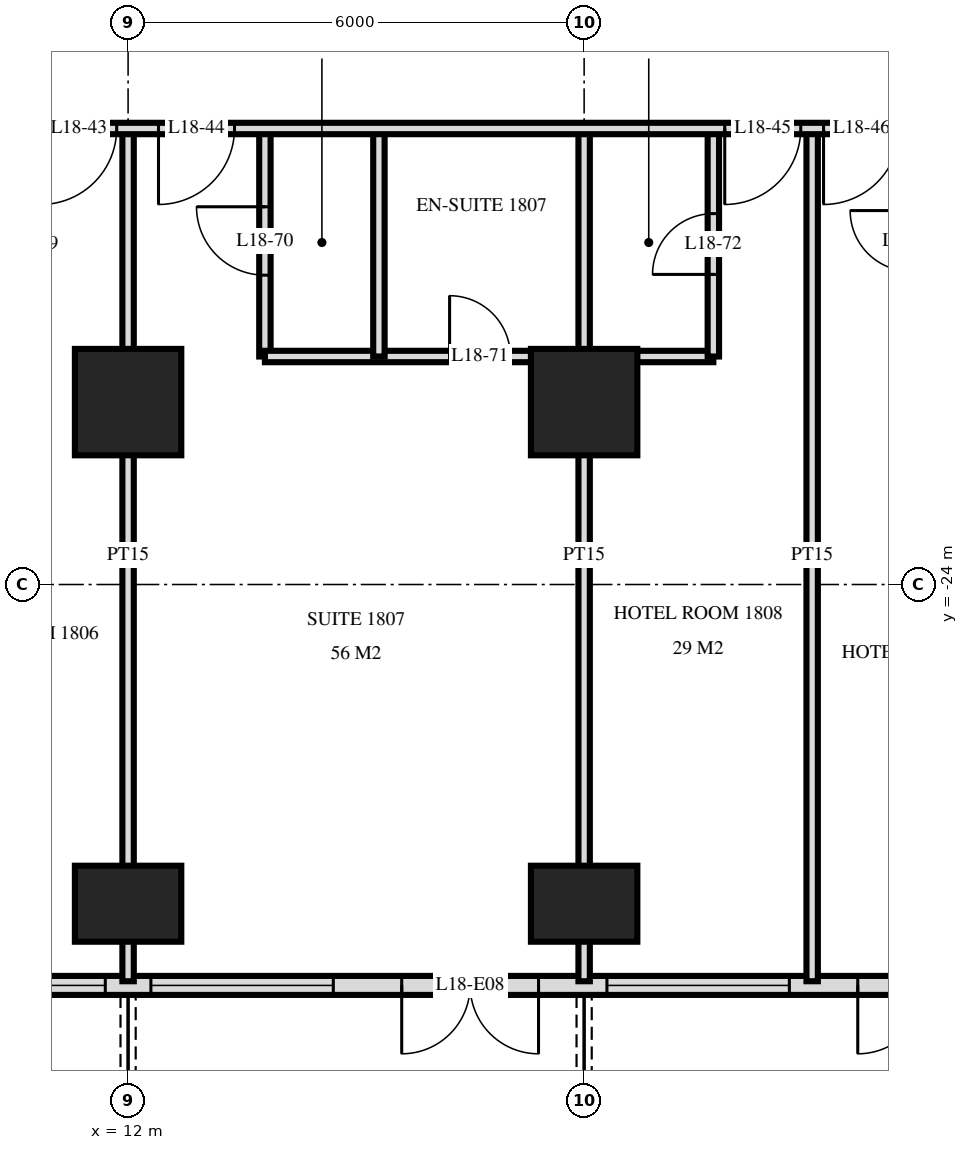
"""IFC4 building model, lengths in metres.
Left out: names, types, materials, properties, quantities, classifications, styles, units other than length and angle.
Written with IfcOpenShell. Run it as: python <this file> out.ifc"""

import sys

from ifc_helpers import new_model, si_unit, direction, frame, frame_2d, origin, origin_2d, place, context, subcontext, project, spatial, rectangle, extrude, element, fill, save


model = new_model("IFC4")
c1 = context("Model", 3, precision=1e-05, world=origin(), true_north=direction((0.0, 1.0)))
c2 = subcontext(c1, "Body", "Model", "MODEL_VIEW")
j1 = project(units=[si_unit("LENGTHUNIT", "METRE"), si_unit("PLANEANGLEUNIT", "RADIAN")], contexts=[c1])
p1 = place(None, origin())
s1 = spatial("IfcSite", under=j1, at=p1, CompositionType="ELEMENT")
p2 = place(p1, origin())
s2 = spatial("IfcBuilding", under=s1, at=p2, CompositionType="ELEMENT")
p3 = place(p2, frame((0.0, 0.0, 74.4)))
s3 = spatial("IfcBuildingStorey", under=s2, at=p3, CompositionType="ELEMENT", Elevation=74.4)
p4 = place(p3, frame((12.0, -28.2, 0.0), z_axis=(0.0, 0.0, 1.0), x_axis=(1.0, 0.0, 0.0)))
e1 = element("IfcColumn", 1, at=p4, inside=s3, PredefinedType="COLUMN", context=c2, shape_type="SweptSolid", body=[
    extrude(rectangle(XDim=1.4, YDim=1.0, at=origin_2d()), origin(), (0.0, 0.0, 1.0), 3.6),
])
p5 = place(p3, frame((12.0, -21.6, 0.0), z_axis=(0.0, 0.0, 1.0), x_axis=(1.0, 0.0, 0.0)))
e2 = element("IfcColumn", 2, at=p5, inside=s3, PredefinedType="COLUMN", context=c2, shape_type="SweptSolid", body=[
    extrude(rectangle(XDim=1.4, YDim=1.4, at=origin_2d()), origin(), (0.0, 0.0, 1.0), 3.6),
])
p6 = place(p3, frame((18.0, -28.2, 0.0), z_axis=(0.0, 0.0, 1.0), x_axis=(1.0, 0.0, 0.0)))
e3 = element("IfcColumn", 3, at=p6, inside=s3, PredefinedType="COLUMN", context=c2, shape_type="SweptSolid", body=[
    extrude(rectangle(XDim=1.4, YDim=1.0, at=origin_2d()), origin(), (0.0, 0.0, 1.0), 3.6),
])
p7 = place(p3, frame((18.0, -21.6, 0.0), z_axis=(0.0, 0.0, 1.0), x_axis=(1.0, 0.0, 0.0)))
e4 = element("IfcColumn", 4, at=p7, inside=s3, PredefinedType="COLUMN", context=c2, shape_type="SweptSolid", body=[
    extrude(rectangle(XDim=1.4, YDim=1.4, at=origin_2d()), origin(), (0.0, 0.0, 1.0), 3.6),
])
p8 = place(p3, frame((-28.775, -29.275, 0.0), z_axis=(0.0, 0.0, 1.0), x_axis=(1.0, 0.0, 0.0)))
e5 = element("IfcWall", 5, at=p8, inside=s3, PredefinedType="SOLIDWALL", context=c2, shape_type="SweptSolid", body=[
    extrude(rectangle(XDim=57.551, YDim=0.25, at=frame_2d((28.775, 0.0))), origin(), (0.0, 0.0, 1.0), 3.32),
])
p9 = place(p8, frame((0.575, 0.0, 0.0)))
e6 = element("IfcOpeningElement", 6, at=p9, cuts=e5, PredefinedType="OPENING", context=c2, shape_type="SweptSolid", body=[
    extrude(rectangle(XDim=1.8, YDim=2.4, at=frame_2d((0.9, 1.2))), frame((0.0, 0.135, 0.0), z_axis=(0.0, -1.0, 0.0), x_axis=(1.0, 0.0, 0.0)), (0.0, 0.0, 1.0), 0.27),
])
p10 = place(p8, frame((5.075, 0.0, 0.3)))
e7 = element("IfcOpeningElement", 7, at=p10, cuts=e5, PredefinedType="OPENING", context=c2, shape_type="SweptSolid", body=[
    extrude(rectangle(XDim=2.4, YDim=2.1, at=frame_2d((1.2, 1.05))), frame((0.0, 0.135, 0.0), z_axis=(0.0, -1.0, 0.0), x_axis=(1.0, 0.0, 0.0)), (0.0, 0.0, 1.0), 0.27),
])
p11 = place(p8, frame((8.375, 0.0, 0.0)))
e8 = element("IfcOpeningElement", 8, at=p11, cuts=e5, PredefinedType="OPENING", context=c2, shape_type="SweptSolid", body=[
    extrude(rectangle(XDim=1.8, YDim=2.4, at=frame_2d((0.9, 1.2))), frame((0.0, 0.135, 0.0), z_axis=(0.0, -1.0, 0.0), x_axis=(1.0, 0.0, 0.0)), (0.0, 0.0, 1.0), 0.27),
])
p12 = place(p8, frame((11.375, 0.0, 0.0)))
e9 = element("IfcOpeningElement", 9, at=p12, cuts=e5, PredefinedType="OPENING", context=c2, shape_type="SweptSolid", body=[
    extrude(rectangle(XDim=1.8, YDim=2.4, at=frame_2d((0.9, 1.2))), frame((0.0, 0.135, 0.0), z_axis=(0.0, -1.0, 0.0), x_axis=(1.0, 0.0, 0.0)), (0.0, 0.0, 1.0), 0.27),
])
p13 = place(p8, frame((14.075, 0.0, 0.3)))
e10 = element("IfcOpeningElement", 10, at=p13, cuts=e5, PredefinedType="OPENING", context=c2, shape_type="SweptSolid", body=[
    extrude(rectangle(XDim=2.4, YDim=2.1, at=frame_2d((1.2, 1.05))), frame((0.0, 0.135, 0.0), z_axis=(0.0, -1.0, 0.0), x_axis=(1.0, 0.0, 0.0)), (0.0, 0.0, 1.0), 0.27),
])
p14 = place(p8, frame((17.375, 0.0, 0.0)))
e11 = element("IfcOpeningElement", 11, at=p14, cuts=e5, PredefinedType="OPENING", context=c2, shape_type="SweptSolid", body=[
    extrude(rectangle(XDim=1.8, YDim=2.4, at=frame_2d((0.9, 1.2))), frame((0.0, 0.135, 0.0), z_axis=(0.0, -1.0, 0.0), x_axis=(1.0, 0.0, 0.0)), (0.0, 0.0, 1.0), 0.27),
])
p15 = place(p8, frame((20.075, 0.0, 0.3)))
e12 = element("IfcOpeningElement", 12, at=p15, cuts=e5, PredefinedType="OPENING", context=c2, shape_type="SweptSolid", body=[
    extrude(rectangle(XDim=2.4, YDim=2.1, at=frame_2d((1.2, 1.05))), frame((0.0, 0.135, 0.0), z_axis=(0.0, -1.0, 0.0), x_axis=(1.0, 0.0, 0.0)), (0.0, 0.0, 1.0), 0.27),
])
p16 = place(p8, frame((23.075, 0.0, 0.3)))
e13 = element("IfcOpeningElement", 13, at=p16, cuts=e5, PredefinedType="OPENING", context=c2, shape_type="SweptSolid", body=[
    extrude(rectangle(XDim=2.4, YDim=2.1, at=frame_2d((1.2, 1.05))), frame((0.0, 0.135, 0.0), z_axis=(0.0, -1.0, 0.0), x_axis=(1.0, 0.0, 0.0)), (0.0, 0.0, 1.0), 0.27),
])
p17 = place(p8, frame((26.375, 0.0, 0.0)))
e14 = element("IfcOpeningElement", 14, at=p17, cuts=e5, PredefinedType="OPENING", context=c2, shape_type="SweptSolid", body=[
    extrude(rectangle(XDim=1.8, YDim=2.4, at=frame_2d((0.9, 1.2))), frame((0.0, 0.135, 0.0), z_axis=(0.0, -1.0, 0.0), x_axis=(1.0, 0.0, 0.0)), (0.0, 0.0, 1.0), 0.27),
])
p18 = place(p8, frame((29.375, 0.0, 0.0)))
e15 = element("IfcOpeningElement", 15, at=p18, cuts=e5, PredefinedType="OPENING", context=c2, shape_type="SweptSolid", body=[
    extrude(rectangle(XDim=1.8, YDim=2.4, at=frame_2d((0.9, 1.2))), frame((0.0, 0.135, 0.0), z_axis=(0.0, -1.0, 0.0), x_axis=(1.0, 0.0, 0.0)), (0.0, 0.0, 1.0), 0.27),
])
p19 = place(p8, frame((32.075, 0.0, 0.3)))
e16 = element("IfcOpeningElement", 16, at=p19, cuts=e5, PredefinedType="OPENING", context=c2, shape_type="SweptSolid", body=[
    extrude(rectangle(XDim=2.4, YDim=2.1, at=frame_2d((1.2, 1.05))), frame((0.0, 0.135, 0.0), z_axis=(0.0, -1.0, 0.0), x_axis=(1.0, 0.0, 0.0)), (0.0, 0.0, 1.0), 0.27),
])
p20 = place(p8, frame((35.375, 0.0, 0.0)))
e17 = element("IfcOpeningElement", 17, at=p20, cuts=e5, PredefinedType="OPENING", context=c2, shape_type="SweptSolid", body=[
    extrude(rectangle(XDim=1.8, YDim=2.4, at=frame_2d((0.9, 1.2))), frame((0.0, 0.135, 0.0), z_axis=(0.0, -1.0, 0.0), x_axis=(1.0, 0.0, 0.0)), (0.0, 0.0, 1.0), 0.27),
])
p21 = place(p8, frame((38.075, 0.0, 0.3)))
e18 = element("IfcOpeningElement", 18, at=p21, cuts=e5, PredefinedType="OPENING", context=c2, shape_type="SweptSolid", body=[
    extrude(rectangle(XDim=2.4, YDim=2.1, at=frame_2d((1.2, 1.05))), frame((0.0, 0.135, 0.0), z_axis=(0.0, -1.0, 0.0), x_axis=(1.0, 0.0, 0.0)), (0.0, 0.0, 1.0), 0.27),
])
p22 = place(p8, frame((41.075, 0.0, 0.3)))
e19 = element("IfcOpeningElement", 19, at=p22, cuts=e5, PredefinedType="OPENING", context=c2, shape_type="SweptSolid", body=[
    extrude(rectangle(XDim=2.4, YDim=2.1, at=frame_2d((1.2, 1.05))), frame((0.0, 0.135, 0.0), z_axis=(0.0, -1.0, 0.0), x_axis=(1.0, 0.0, 0.0)), (0.0, 0.0, 1.0), 0.27),
])
p23 = place(p8, frame((44.375, 0.0, 0.0)))
e20 = element("IfcOpeningElement", 20, at=p23, cuts=e5, PredefinedType="OPENING", context=c2, shape_type="SweptSolid", body=[
    extrude(rectangle(XDim=1.8, YDim=2.4, at=frame_2d((0.9, 1.2))), frame((0.0, 0.135, 0.0), z_axis=(0.0, -1.0, 0.0), x_axis=(1.0, 0.0, 0.0)), (0.0, 0.0, 1.0), 0.27),
])
p24 = place(p8, frame((47.075, 0.0, 0.3)))
e21 = element("IfcOpeningElement", 21, at=p24, cuts=e5, PredefinedType="OPENING", context=c2, shape_type="SweptSolid", body=[
    extrude(rectangle(XDim=2.4, YDim=2.1, at=frame_2d((1.2, 1.05))), frame((0.0, 0.135, 0.0), z_axis=(0.0, -1.0, 0.0), x_axis=(1.0, 0.0, 0.0)), (0.0, 0.0, 1.0), 0.27),
])
p25 = place(p8, frame((50.375, 0.0, 0.0)))
e22 = element("IfcOpeningElement", 22, at=p25, cuts=e5, PredefinedType="OPENING", context=c2, shape_type="SweptSolid", body=[
    extrude(rectangle(XDim=1.8, YDim=2.4, at=frame_2d((0.9, 1.2))), frame((0.0, 0.135, 0.0), z_axis=(0.0, -1.0, 0.0), x_axis=(1.0, 0.0, 0.0)), (0.0, 0.0, 1.0), 0.27),
])
p26 = place(p8, frame((53.375, 0.0, 0.0)))
e23 = element("IfcOpeningElement", 23, at=p26, cuts=e5, PredefinedType="OPENING", context=c2, shape_type="SweptSolid", body=[
    extrude(rectangle(XDim=1.8, YDim=2.4, at=frame_2d((0.9, 1.2))), frame((0.0, 0.135, 0.0), z_axis=(0.0, -1.0, 0.0), x_axis=(1.0, 0.0, 0.0)), (0.0, 0.0, 1.0), 0.27),
])
p27 = place(p3, frame((21.0, -29.22, 0.0), z_axis=(0.0, 0.0, 1.0), x_axis=(0.0, 1.0, 0.0)))
e24 = element("IfcWall", 24, at=p27, inside=s3, PredefinedType="PARTITIONING", context=c2, shape_type="SweptSolid", body=[
    extrude(rectangle(XDim=11.22, YDim=0.15, at=frame_2d((5.61, 0.0))), origin(), (0.0, 0.0, 1.0), 3.32),
])
p28 = place(p3, frame((19.7, -21.0, 0.0), z_axis=(0.0, 0.0, 1.0), x_axis=(0.0, 1.0, 0.0)))
e25 = element("IfcWall", 25, at=p28, inside=s3, PredefinedType="PARTITIONING", context=c2, shape_type="SweptSolid", body=[
    extrude(rectangle(XDim=3.0, YDim=0.15, at=frame_2d((1.5, 0.0))), origin(), (0.0, 0.0, 1.0), 3.32),
])
p29 = place(p28, frame((1.08, 0.0, 0.0)))
e26 = element("IfcOpeningElement", 26, at=p29, cuts=e25, PredefinedType="OPENING", context=c2, shape_type="SweptSolid", body=[
    extrude(rectangle(XDim=0.8, YDim=2.1, at=frame_2d((0.4, 1.05))), frame((0.0, 0.085, 0.0), z_axis=(0.0, -1.0, 0.0), x_axis=(1.0, 0.0, 0.0)), (0.0, 0.0, 1.0), 0.17),
])
p30 = place(p3, frame((18.0, -29.22, 0.0), z_axis=(0.0, 0.0, 1.0), x_axis=(0.0, 1.0, 0.0)))
e27 = element("IfcWall", 27, at=p30, inside=s3, PredefinedType="PARTITIONING", context=c2, shape_type="SweptSolid", body=[
    extrude(rectangle(XDim=11.22, YDim=0.15, at=frame_2d((5.61, 0.0))), origin(), (0.0, 0.0, 1.0), 3.32),
])
p31 = place(p3, frame((15.3, -21.0, 0.0), z_axis=(0.0, 0.0, 1.0), x_axis=(0.0, 1.0, 0.0)))
e28 = element("IfcWall", 28, at=p31, inside=s3, PredefinedType="PARTITIONING", context=c2, shape_type="SweptSolid", body=[
    extrude(rectangle(XDim=3.0, YDim=0.15, at=frame_2d((1.5, 0.0))), origin(), (0.0, 0.0, 1.0), 3.32),
])
p32 = place(p3, frame((13.8, -21.0, 0.0), z_axis=(0.0, 0.0, 1.0), x_axis=(0.0, 1.0, 0.0)))
e29 = element("IfcWall", 29, at=p32, inside=s3, PredefinedType="PARTITIONING", context=c2, shape_type="SweptSolid", body=[
    extrude(rectangle(XDim=3.0, YDim=0.15, at=frame_2d((1.5, 0.0))), origin(), (0.0, 0.0, 1.0), 3.32),
])
p33 = place(p32, frame((1.07, 0.0, 0.0)))
e30 = element("IfcOpeningElement", 30, at=p33, cuts=e29, PredefinedType="OPENING", context=c2, shape_type="SweptSolid", body=[
    extrude(rectangle(XDim=0.9, YDim=2.1, at=frame_2d((0.45, 1.05))), frame((0.0, 0.085, 0.0), z_axis=(0.0, -1.0, 0.0), x_axis=(1.0, 0.0, 0.0)), (0.0, 0.0, 1.0), 0.17),
])
p34 = place(p3, frame((12.0, -29.22, 0.0), z_axis=(0.0, 0.0, 1.0), x_axis=(0.0, 1.0, 0.0)))
e31 = element("IfcWall", 31, at=p34, inside=s3, PredefinedType="PARTITIONING", context=c2, shape_type="SweptSolid", body=[
    extrude(rectangle(XDim=11.22, YDim=0.15, at=frame_2d((5.61, 0.0))), origin(), (0.0, 0.0, 1.0), 3.32),
])
p35 = place(p3, frame((13.8, -21.0, 0.0), z_axis=(0.0, 0.0, 1.0), x_axis=(1.0, 0.0, 0.0)))
e32 = element("IfcWall", 32, at=p35, inside=s3, PredefinedType="PARTITIONING", context=c2, shape_type="SweptSolid", body=[
    extrude(rectangle(XDim=5.9, YDim=0.15, at=frame_2d((2.95, 0.0))), origin(), (0.0, 0.0, 1.0), 3.32),
])
p36 = place(p35, frame((2.43, 0.0, 0.0)))
e33 = element("IfcOpeningElement", 33, at=p36, cuts=e32, PredefinedType="OPENING", context=c2, shape_type="SweptSolid", body=[
    extrude(rectangle(XDim=0.8, YDim=2.1, at=frame_2d((0.4, 1.05))), frame((0.0, 0.085, 0.0), z_axis=(0.0, -1.0, 0.0), x_axis=(1.0, 0.0, 0.0)), (0.0, 0.0, 1.0), 0.17),
])
p37 = place(p3, frame((-33.12, -18.0, 0.0), z_axis=(0.0, 0.0, 1.0), x_axis=(1.0, 0.0, 0.0)))
e34 = element("IfcWall", 34, at=p37, inside=s3, PredefinedType="PARTITIONING", context=c2, shape_type="SweptSolid", body=[
    extrude(rectangle(XDim=66.24, YDim=0.15, at=frame_2d((33.12, 0.0))), origin(), (0.0, 0.0, 1.0), 3.32),
])
p38 = place(p37, frame((15.27, 0.0, 0.0)))
e35 = element("IfcOpeningElement", 35, at=p38, cuts=e34, PredefinedType="OPENING", context=c2, shape_type="SweptSolid", body=[
    extrude(rectangle(XDim=1.0, YDim=2.1, at=frame_2d((0.5, 1.05))), frame((0.0, 0.085, 0.0), z_axis=(0.0, -1.0, 0.0), x_axis=(1.0, 0.0, 0.0)), (0.0, 0.0, 1.0), 0.17),
])
p39 = place(p37, frame((21.22, 0.0, 0.0)))
e36 = element("IfcOpeningElement", 36, at=p39, cuts=e34, PredefinedType="OPENING", context=c2, shape_type="SweptSolid", body=[
    extrude(rectangle(XDim=1.0, YDim=2.1, at=frame_2d((0.5, 1.05))), frame((0.0, 0.085, 0.0), z_axis=(0.0, -1.0, 0.0), x_axis=(1.0, 0.0, 0.0)), (0.0, 0.0, 1.0), 0.17),
])
p40 = place(p37, frame((24.27, 0.0, 0.0)))
e37 = element("IfcOpeningElement", 37, at=p40, cuts=e34, PredefinedType="OPENING", context=c2, shape_type="SweptSolid", body=[
    extrude(rectangle(XDim=1.0, YDim=2.1, at=frame_2d((0.5, 1.05))), frame((0.0, 0.085, 0.0), z_axis=(0.0, -1.0, 0.0), x_axis=(1.0, 0.0, 0.0)), (0.0, 0.0, 1.0), 0.17),
])
p41 = place(p37, frame((30.97, 0.0, 0.0)))
e38 = element("IfcOpeningElement", 38, at=p41, cuts=e34, PredefinedType="OPENING", context=c2, shape_type="SweptSolid", body=[
    extrude(rectangle(XDim=1.0, YDim=2.1, at=frame_2d((0.5, 1.05))), frame((0.0, 0.085, 0.0), z_axis=(0.0, -1.0, 0.0), x_axis=(1.0, 0.0, 0.0)), (0.0, 0.0, 1.0), 0.17),
])
p42 = place(p37, frame((40.42, 0.0, 0.0)))
e39 = element("IfcOpeningElement", 39, at=p42, cuts=e34, PredefinedType="OPENING", context=c2, shape_type="SweptSolid", body=[
    extrude(rectangle(XDim=1.0, YDim=2.1, at=frame_2d((0.5, 1.05))), frame((0.0, 0.085, 0.0), z_axis=(0.0, -1.0, 0.0), x_axis=(1.0, 0.0, 0.0)), (0.0, 0.0, 1.0), 0.17),
])
p43 = place(p37, frame((43.97, 0.0, 0.0)))
e40 = element("IfcOpeningElement", 40, at=p43, cuts=e34, PredefinedType="OPENING", context=c2, shape_type="SweptSolid", body=[
    extrude(rectangle(XDim=1.0, YDim=2.1, at=frame_2d((0.5, 1.05))), frame((0.0, 0.085, 0.0), z_axis=(0.0, -1.0, 0.0), x_axis=(1.0, 0.0, 0.0)), (0.0, 0.0, 1.0), 0.17),
])
p44 = place(p37, frame((45.52, 0.0, 0.0)))
e41 = element("IfcOpeningElement", 41, at=p44, cuts=e34, PredefinedType="OPENING", context=c2, shape_type="SweptSolid", body=[
    extrude(rectangle(XDim=1.0, YDim=2.1, at=frame_2d((0.5, 1.05))), frame((0.0, 0.085, 0.0), z_axis=(0.0, -1.0, 0.0), x_axis=(1.0, 0.0, 0.0)), (0.0, 0.0, 1.0), 0.17),
])
p45 = place(p37, frame((52.97, 0.0, 0.0)))
e42 = element("IfcOpeningElement", 42, at=p45, cuts=e34, PredefinedType="OPENING", context=c2, shape_type="SweptSolid", body=[
    extrude(rectangle(XDim=1.0, YDim=2.1, at=frame_2d((0.5, 1.05))), frame((0.0, 0.085, 0.0), z_axis=(0.0, -1.0, 0.0), x_axis=(1.0, 0.0, 0.0)), (0.0, 0.0, 1.0), 0.17),
])
p46 = place(p37, frame((54.27, 0.0, 0.0)))
e43 = element("IfcOpeningElement", 43, at=p46, cuts=e34, PredefinedType="OPENING", context=c2, shape_type="SweptSolid", body=[
    extrude(rectangle(XDim=1.0, YDim=2.1, at=frame_2d((0.5, 1.05))), frame((0.0, 0.085, 0.0), z_axis=(0.0, -1.0, 0.0), x_axis=(1.0, 0.0, 0.0)), (0.0, 0.0, 1.0), 0.17),
])
p47 = place(p37, frame((13.42, 0.0, 0.0)))
e44 = element("IfcOpeningElement", 44, at=p47, cuts=e34, PredefinedType="OPENING", context=c2, shape_type="SweptSolid", body=[
    extrude(rectangle(XDim=1.0, YDim=2.1, at=frame_2d((0.5, 1.05))), frame((0.0, 0.085, 0.0), z_axis=(0.0, -1.0, 0.0), x_axis=(1.0, 0.0, 0.0)), (0.0, 0.0, 1.0), 0.17),
])
p48 = place(p37, frame((60.82, 0.0, 0.0)))
e45 = element("IfcOpeningElement", 45, at=p48, cuts=e34, PredefinedType="OPENING", context=c2, shape_type="SweptSolid", body=[
    extrude(rectangle(XDim=1.0, YDim=2.1, at=frame_2d((0.5, 1.05))), frame((0.0, 0.085, 0.0), z_axis=(0.0, -1.0, 0.0), x_axis=(1.0, 0.0, 0.0)), (0.0, 0.0, 1.0), 0.17),
])
p49 = place(p21, origin())
e46 = element("IfcWindow", 46, at=p49, inside=s3, PartitioningType="SINGLE_PANEL", PredefinedType="WINDOW", context=c2, shape_type="SweptSolid", body=[
    extrude(rectangle(XDim=2.4, YDim=2.1, at=frame_2d((1.2, 1.05))), frame((0.0, 0.03, 0.0), z_axis=(0.0, -1.0, 0.0), x_axis=(1.0, 0.0, 0.0)), (0.0, 0.0, 1.0), 0.06),
])
fill(e18, e46)
p50 = place(p22, origin())
e47 = element("IfcWindow", 47, at=p50, inside=s3, PartitioningType="SINGLE_PANEL", PredefinedType="WINDOW", context=c2, shape_type="SweptSolid", body=[
    extrude(rectangle(XDim=2.4, YDim=2.1, at=frame_2d((1.2, 1.05))), frame((0.0, 0.03, 0.0), z_axis=(0.0, -1.0, 0.0), x_axis=(1.0, 0.0, 0.0)), (0.0, 0.0, 1.0), 0.06),
])
fill(e19, e47)
p51 = place(p23, frame((0.9, 0.0, 0.0), z_axis=(0.0, 0.0, 1.0), x_axis=(-1.0, 0.0, 0.0)))
e48 = element("IfcDoor", 48, at=p51, inside=s3, OperationType="DOUBLE_DOOR_SINGLE_SWING", PredefinedType="DOOR", context=c2, shape_type="SweptSolid", body=[
    extrude(rectangle(XDim=1.8, YDim=2.4, at=frame_2d((0.0, 1.2))), frame((0.0, -0.025, 0.0), z_axis=(0.0, 1.0, 0.0), x_axis=(-1.0, 0.0, 0.0)), (0.0, 0.0, 1.0), 0.05),
])
fill(e20, e48)
p52 = place(p24, origin())
e49 = element("IfcWindow", 49, at=p52, inside=s3, PartitioningType="SINGLE_PANEL", PredefinedType="WINDOW", context=c2, shape_type="SweptSolid", body=[
    extrude(rectangle(XDim=2.4, YDim=2.1, at=frame_2d((1.2, 1.05))), frame((0.0, 0.03, 0.0), z_axis=(0.0, -1.0, 0.0), x_axis=(1.0, 0.0, 0.0)), (0.0, 0.0, 1.0), 0.06),
])
fill(e21, e49)
p53 = place(p25, frame((0.9, 0.0, 0.0), z_axis=(0.0, 0.0, 1.0), x_axis=(-1.0, 0.0, 0.0)))
e50 = element("IfcDoor", 50, at=p53, inside=s3, OperationType="DOUBLE_DOOR_SINGLE_SWING", PredefinedType="DOOR", context=c2, shape_type="SweptSolid", body=[
    extrude(rectangle(XDim=1.8, YDim=2.4, at=frame_2d((0.0, 1.2))), frame((0.0, -0.025, 0.0), z_axis=(0.0, 1.0, 0.0), x_axis=(-1.0, 0.0, 0.0)), (0.0, 0.0, 1.0), 0.05),
])
fill(e22, e50)
p54 = place(p43, frame((0.5, 0.0, 0.0), z_axis=(0.0, 0.0, 1.0), x_axis=(-1.0, 0.0, 0.0)))
e51 = element("IfcDoor", 51, at=p54, inside=s3, OperationType="SINGLE_SWING_LEFT", PredefinedType="DOOR", context=c2, shape_type="SweptSolid", body=[
    extrude(rectangle(XDim=1.0, YDim=2.1, at=frame_2d((0.0, 1.05))), frame((0.0, -0.025, 0.0), z_axis=(0.0, 1.0, 0.0), x_axis=(-1.0, 0.0, 0.0)), (0.0, 0.0, 1.0), 0.05),
])
fill(e40, e51)
p55 = place(p44, frame((0.5, 0.0, 0.0), z_axis=(0.0, 0.0, 1.0), x_axis=(-1.0, 0.0, 0.0)))
e52 = element("IfcDoor", 52, at=p55, inside=s3, OperationType="SINGLE_SWING_LEFT", PredefinedType="DOOR", context=c2, shape_type="SweptSolid", body=[
    extrude(rectangle(XDim=1.0, YDim=2.1, at=frame_2d((0.0, 1.05))), frame((0.0, -0.025, 0.0), z_axis=(0.0, 1.0, 0.0), x_axis=(-1.0, 0.0, 0.0)), (0.0, 0.0, 1.0), 0.05),
])
fill(e41, e52)
p56 = place(p45, frame((0.5, 0.0, 0.0), z_axis=(0.0, 0.0, 1.0), x_axis=(-1.0, 0.0, 0.0)))
e53 = element("IfcDoor", 53, at=p56, inside=s3, OperationType="SINGLE_SWING_LEFT", PredefinedType="DOOR", context=c2, shape_type="SweptSolid", body=[
    extrude(rectangle(XDim=1.0, YDim=2.1, at=frame_2d((0.0, 1.05))), frame((0.0, -0.025, 0.0), z_axis=(0.0, 1.0, 0.0), x_axis=(-1.0, 0.0, 0.0)), (0.0, 0.0, 1.0), 0.05),
])
fill(e42, e53)
p57 = place(p46, frame((0.5, 0.0, 0.0), z_axis=(0.0, 0.0, 1.0), x_axis=(-1.0, 0.0, 0.0)))
e54 = element("IfcDoor", 54, at=p57, inside=s3, OperationType="SINGLE_SWING_LEFT", PredefinedType="DOOR", context=c2, shape_type="SweptSolid", body=[
    extrude(rectangle(XDim=1.0, YDim=2.1, at=frame_2d((0.0, 1.05))), frame((0.0, -0.025, 0.0), z_axis=(0.0, 1.0, 0.0), x_axis=(-1.0, 0.0, 0.0)), (0.0, 0.0, 1.0), 0.05),
])
fill(e43, e54)
p58 = place(p33, origin())
e55 = element("IfcDoor", 55, at=p58, inside=s3, OperationType="SINGLE_SWING_LEFT", PredefinedType="DOOR", context=c2, shape_type="SweptSolid", body=[
    extrude(rectangle(XDim=0.9, YDim=2.1, at=frame_2d((0.45, 1.05))), frame((0.0, 0.025, 0.0), z_axis=(0.0, -1.0, 0.0), x_axis=(1.0, 0.0, 0.0)), (0.0, 0.0, 1.0), 0.05),
])
fill(e30, e55)
p59 = place(p36, origin())
e56 = element("IfcDoor", 56, at=p59, inside=s3, OperationType="SINGLE_SWING_RIGHT", PredefinedType="DOOR", context=c2, shape_type="SweptSolid", body=[
    extrude(rectangle(XDim=0.8, YDim=2.1, at=frame_2d((0.4, 1.05))), frame((0.0, 0.025, 0.0), z_axis=(0.0, -1.0, 0.0), x_axis=(1.0, 0.0, 0.0)), (0.0, 0.0, 1.0), 0.05),
])
fill(e33, e56)
p60 = place(p29, origin())
e57 = element("IfcDoor", 57, at=p60, inside=s3, OperationType="SINGLE_SWING_RIGHT", PredefinedType="DOOR", context=c2, shape_type="SweptSolid", body=[
    extrude(rectangle(XDim=0.8, YDim=2.1, at=frame_2d((0.4, 1.05))), frame((0.0, 0.025, 0.0), z_axis=(0.0, -1.0, 0.0), x_axis=(1.0, 0.0, 0.0)), (0.0, 0.0, 1.0), 0.05),
])
fill(e26, e57)
save(model, sys.argv[1])
